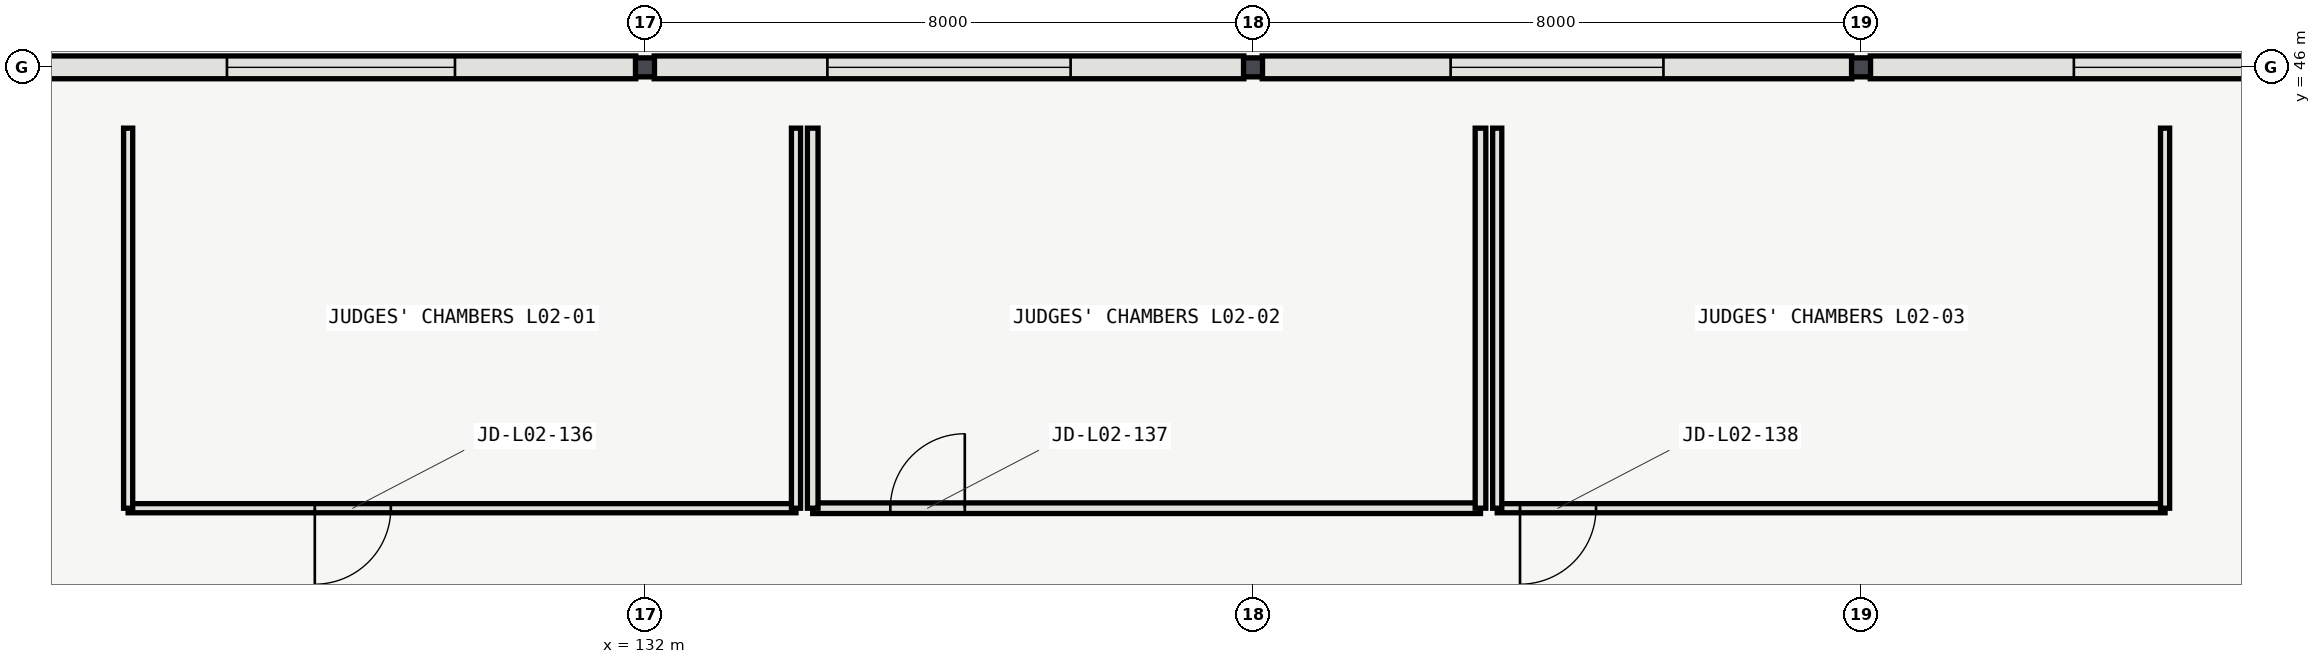
"""IFC4 building model, lengths in metres.
Left out: names, types, materials, properties, quantities, classifications, styles, units other than length and angle.
Written with IfcOpenShell. Run it as: python <this file> out.ifc"""

import sys

from ifc_helpers import new_model, si_unit, direction, frame, frame_2d, origin, origin_2d, place, context, subcontext, project, spatial, rectangle, i_section, extrude, element, fill, save


model = new_model("IFC4")
c1 = context("Model", 3, precision=1e-05, world=origin(), true_north=direction((0.0, 1.0)))
c2 = subcontext(c1, "Body", "Model", "MODEL_VIEW")
j1 = project(units=[si_unit("LENGTHUNIT", "METRE"), si_unit("PLANEANGLEUNIT", "RADIAN")], contexts=[c1])
p1 = place(None, origin())
s1 = spatial("IfcSite", under=j1, at=p1, CompositionType="ELEMENT")
p2 = place(p1, origin())
s2 = spatial("IfcBuilding", under=s1, at=p2, CompositionType="ELEMENT")
p3 = place(p2, frame((0.0, 0.0, 10.8)))
s3 = spatial("IfcBuildingStorey", under=s2, at=p3, CompositionType="ELEMENT", Elevation=10.8)
for number, where, z_axis, x_axis in (
    (1, (132.0, 46.0, 0.0), (0.0, 0.0, 1.0), (1.0, 0.0, 0.0)),
    (2, (140.0, 46.0, 0.0), (0.0, 0.0, 1.0), (1.0, 0.0, 0.0)),
    (3, (148.0, 46.0, 0.0), (0.0, 0.0, 1.0), (1.0, 0.0, 0.0)),
):
    element("IfcColumn", number, at=place(p3, frame(where, z_axis=z_axis, x_axis=x_axis)), inside=s3, PredefinedType="COLUMN", context=c2, shape_type="SweptSolid", body=[
        extrude(i_section(OverallWidth=0.25, OverallDepth=0.25, WebThickness=0.009, FlangeThickness=0.014, FilletRadius=0.016, at=origin_2d()), origin(), (0.0, 0.0, 1.0), 5.4),
    ])
p4 = place(p3, frame((131.879, 46.0, 0.0), z_axis=(0.0, 0.0, 1.0), x_axis=(-1.0, 0.0, 0.0)))
e4 = element("IfcWall", 4, at=p4, inside=s3, PredefinedType="SOLIDWALL", context=c2, shape_type="SweptSolid", body=[
    extrude(rectangle(XDim=7.758, YDim=0.3, at=frame_2d((3.879, 0.0))), origin(), (0.0, 0.0, 1.0), 4.603),
])
p5 = place(p4, frame((2.379, 0.0, 0.95)))
e5 = element("IfcOpeningElement", 5, at=p5, cuts=e4, PredefinedType="OPENING", context=c2, shape_type="SweptSolid", body=[
    extrude(rectangle(XDim=3.0, YDim=2.4, at=frame_2d((1.5, 1.2))), frame((0.0, 0.16, 0.0), z_axis=(0.0, -1.0, 0.0), x_axis=(1.0, 0.0, 0.0)), (0.0, 0.0, 1.0), 0.32),
])
p6 = place(p3, frame((139.879, 46.0, 0.0), z_axis=(0.0, 0.0, 1.0), x_axis=(-1.0, 0.0, 0.0)))
e6 = element("IfcWall", 6, at=p6, inside=s3, PredefinedType="SOLIDWALL", context=c2, shape_type="SweptSolid", body=[
    extrude(rectangle(XDim=7.758, YDim=0.3, at=frame_2d((3.879, 0.0))), origin(), (0.0, 0.0, 1.0), 4.603),
])
p7 = place(p6, frame((2.279, 0.0, 0.95)))
e7 = element("IfcOpeningElement", 7, at=p7, cuts=e6, PredefinedType="OPENING", context=c2, shape_type="SweptSolid", body=[
    extrude(rectangle(XDim=3.2, YDim=2.6, at=frame_2d((1.6, 1.3))), frame((0.0, 0.16, 0.0), z_axis=(0.0, -1.0, 0.0), x_axis=(1.0, 0.0, 0.0)), (0.0, 0.0, 1.0), 0.32),
])
p8 = place(p3, frame((147.879, 46.0, 0.0), z_axis=(0.0, 0.0, 1.0), x_axis=(-1.0, 0.0, 0.0)))
e8 = element("IfcWall", 8, at=p8, inside=s3, PredefinedType="SOLIDWALL", context=c2, shape_type="SweptSolid", body=[
    extrude(rectangle(XDim=7.758, YDim=0.3, at=frame_2d((3.879, 0.0))), origin(), (0.0, 0.0, 1.0), 4.603),
])
p9 = place(p8, frame((2.479, 0.0, 0.95)))
e9 = element("IfcOpeningElement", 9, at=p9, cuts=e8, PredefinedType="OPENING", context=c2, shape_type="SweptSolid", body=[
    extrude(rectangle(XDim=2.8, YDim=2.6, at=frame_2d((1.4, 1.3))), frame((0.0, 0.16, 0.0), z_axis=(0.0, -1.0, 0.0), x_axis=(1.0, 0.0, 0.0)), (0.0, 0.0, 1.0), 0.32),
])
p10 = place(p3, frame((155.879, 46.0, 0.0), z_axis=(0.0, 0.0, 1.0), x_axis=(-1.0, 0.0, 0.0)))
e10 = element("IfcWall", 10, at=p10, inside=s3, PredefinedType="SOLIDWALL", context=c2, shape_type="SweptSolid", body=[
    extrude(rectangle(XDim=7.758, YDim=0.3, at=frame_2d((3.879, 0.0))), origin(), (0.0, 0.0, 1.0), 4.603),
])
p11 = place(p10, frame((2.679, 0.0, 0.95)))
e11 = element("IfcOpeningElement", 11, at=p11, cuts=e10, PredefinedType="OPENING", context=c2, shape_type="SweptSolid", body=[
    extrude(rectangle(XDim=2.4, YDim=2.6, at=frame_2d((1.2, 1.3))), frame((0.0, 0.16, 0.0), z_axis=(0.0, -1.0, 0.0), x_axis=(1.0, 0.0, 0.0)), (0.0, 0.0, 1.0), 0.32),
])
p12 = place(p3, frame((125.2, 40.2, 0.0), z_axis=(0.0, 0.0, 1.0), x_axis=(1.0, 0.0, 0.0)))
e12 = element("IfcWall", 12, at=p12, inside=s3, PredefinedType="PARTITIONING", context=c2, shape_type="SweptSolid", body=[
    extrude(rectangle(XDim=8.787, YDim=0.12, at=frame_2d((4.394, 0.0))), origin(), (0.0, 0.0, 1.0), 5.12),
])
p13 = place(p12, frame((2.456, 0.0, 0.0)))
e13 = element("IfcOpeningElement", 13, at=p13, cuts=e12, PredefinedType="OPENING", context=c2, shape_type="SweptSolid", body=[
    extrude(rectangle(XDim=1.0, YDim=2.2, at=frame_2d((0.5, 1.1))), frame((0.0, 0.07, 0.0), z_axis=(0.0, -1.0, 0.0), x_axis=(1.0, 0.0, 0.0)), (0.0, 0.0, 1.0), 0.14),
])
for number, where, z_axis, x_axis in (
    (14, (125.2, 45.2, 0.0), (0.0, 0.0, 1.0), (0.0, -1.0, 0.0)),
    (15, (133.987, 40.2, 0.0), (0.0, 0.0, 1.0), (0.0, 1.0, 0.0)),
):
    element("IfcWall", number, at=place(p3, frame(where, z_axis=z_axis, x_axis=x_axis)), inside=s3, PredefinedType="PARTITIONING", context=c2, shape_type="SweptSolid", body=[
        extrude(rectangle(XDim=5.0, YDim=0.12, at=frame_2d((2.5, 0.0))), origin(), (0.0, 0.0, 1.0), 5.12),
    ])
p14 = place(p3, frame((134.207, 40.2, 0.0), z_axis=(0.0, 0.0, 1.0), x_axis=(1.0, 0.0, 0.0)))
e16 = element("IfcWall", 16, at=p14, inside=s3, PredefinedType="PARTITIONING", context=c2, shape_type="SweptSolid", body=[
    extrude(rectangle(XDim=8.786, YDim=0.14, at=frame_2d((4.393, 0.0))), origin(), (0.0, 0.0, 1.0), 5.12),
])
p15 = place(p14, frame((1.021, 0.0, 0.0)))
e17 = element("IfcOpeningElement", 17, at=p15, cuts=e16, PredefinedType="OPENING", context=c2, shape_type="SweptSolid", body=[
    extrude(rectangle(XDim=0.98, YDim=2.2, at=frame_2d((0.49, 1.1))), frame((0.0, 0.08, 0.0), z_axis=(0.0, -1.0, 0.0), x_axis=(1.0, 0.0, 0.0)), (0.0, 0.0, 1.0), 0.16),
])
for number, where, z_axis, x_axis in (
    (18, (134.207, 45.2, 0.0), (0.0, 0.0, 1.0), (0.0, -1.0, 0.0)),
    (19, (142.993, 40.2, 0.0), (0.0, 0.0, 1.0), (0.0, 1.0, 0.0)),
):
    element("IfcWall", number, at=place(p3, frame(where, z_axis=z_axis, x_axis=x_axis)), inside=s3, PredefinedType="PARTITIONING", context=c2, shape_type="SweptSolid", body=[
        extrude(rectangle(XDim=5.0, YDim=0.14, at=frame_2d((2.5, 0.0))), origin(), (0.0, 0.0, 1.0), 5.12),
    ])
p16 = place(p3, frame((143.213, 40.2, 0.0), z_axis=(0.0, 0.0, 1.0), x_axis=(1.0, 0.0, 0.0)))
e20 = element("IfcWall", 20, at=p16, inside=s3, PredefinedType="PARTITIONING", context=c2, shape_type="SweptSolid", body=[
    extrude(rectangle(XDim=8.787, YDim=0.12, at=frame_2d((4.394, 0.0))), origin(), (0.0, 0.0, 1.0), 5.12),
])
p17 = place(p16, frame((0.3, 0.0, 0.0)))
e21 = element("IfcOpeningElement", 21, at=p17, cuts=e20, PredefinedType="OPENING", context=c2, shape_type="SweptSolid", body=[
    extrude(rectangle(XDim=1.0, YDim=2.15, at=frame_2d((0.5, 1.075))), frame((0.0, 0.07, 0.0), z_axis=(0.0, -1.0, 0.0), x_axis=(1.0, 0.0, 0.0)), (0.0, 0.0, 1.0), 0.14),
])
p18 = place(p3, frame((143.213, 45.2, 0.0), z_axis=(0.0, 0.0, 1.0), x_axis=(0.0, -1.0, 0.0)))
e22 = element("IfcWall", 22, at=p18, inside=s3, PredefinedType="PARTITIONING", context=c2, shape_type="SweptSolid", body=[
    extrude(rectangle(XDim=5.0, YDim=0.12, at=frame_2d((2.5, 0.0))), origin(), (0.0, 0.0, 1.0), 5.12),
])
p19 = place(p3, frame((152.0, 40.2, 0.0), z_axis=(0.0, 0.0, 1.0), x_axis=(0.0, 1.0, 0.0)))
e23 = element("IfcWall", 23, at=p19, inside=s3, PredefinedType="PARTITIONING", context=c2, shape_type="SweptSolid", body=[
    extrude(rectangle(XDim=5.0, YDim=0.12, at=frame_2d((2.5, 0.0))), origin(), (0.0, 0.0, 1.0), 4.646),
])
p20 = place(p5, origin())
e24 = element("IfcWindow", 24, at=p20, inside=s3, PartitioningType="SINGLE_PANEL", PredefinedType="WINDOW", context=c2, shape_type="SweptSolid", body=[
    extrude(rectangle(XDim=3.0, YDim=2.4, at=frame_2d((1.5, 1.2))), frame((0.0, 0.03, 0.0), z_axis=(0.0, -1.0, 0.0), x_axis=(1.0, 0.0, 0.0)), (0.0, 0.0, 1.0), 0.06),
])
fill(e5, e24)
p21 = place(p7, origin())
e25 = element("IfcWindow", 25, at=p21, inside=s3, PartitioningType="SINGLE_PANEL", PredefinedType="WINDOW", context=c2, shape_type="SweptSolid", body=[
    extrude(rectangle(XDim=3.2, YDim=2.6, at=frame_2d((1.6, 1.3))), frame((0.0, 0.03, 0.0), z_axis=(0.0, -1.0, 0.0), x_axis=(1.0, 0.0, 0.0)), (0.0, 0.0, 1.0), 0.06),
])
fill(e7, e25)
p22 = place(p9, origin())
e26 = element("IfcWindow", 26, at=p22, inside=s3, PartitioningType="SINGLE_PANEL", PredefinedType="WINDOW", context=c2, shape_type="SweptSolid", body=[
    extrude(rectangle(XDim=2.8, YDim=2.6, at=frame_2d((1.4, 1.3))), frame((0.0, 0.03, 0.0), z_axis=(0.0, -1.0, 0.0), x_axis=(1.0, 0.0, 0.0)), (0.0, 0.0, 1.0), 0.06),
])
fill(e9, e26)
p23 = place(p11, origin())
e27 = element("IfcWindow", 27, at=p23, inside=s3, PartitioningType="SINGLE_PANEL", PredefinedType="WINDOW", context=c2, shape_type="SweptSolid", body=[
    extrude(rectangle(XDim=2.4, YDim=2.6, at=frame_2d((1.2, 1.3))), frame((0.0, 0.03, 0.0), z_axis=(0.0, -1.0, 0.0), x_axis=(1.0, 0.0, 0.0)), (0.0, 0.0, 1.0), 0.06),
])
fill(e11, e27)
p24 = place(p13, origin())
e28 = element("IfcDoor", 28, at=p24, inside=s3, OperationType="SINGLE_SWING_LEFT", PredefinedType="DOOR", context=c2, shape_type="SweptSolid", body=[
    extrude(rectangle(XDim=1.0, YDim=2.2, at=frame_2d((0.5, 1.1))), frame((0.0, 0.025, 0.0), z_axis=(0.0, -1.0, 0.0), x_axis=(1.0, 0.0, 0.0)), (0.0, 0.0, 1.0), 0.05),
])
fill(e13, e28)
p25 = place(p15, origin())
e29 = element("IfcDoor", 29, at=p25, inside=s3, OperationType="SINGLE_SWING_RIGHT", PredefinedType="DOOR", context=c2, shape_type="SweptSolid", body=[
    extrude(rectangle(XDim=0.98, YDim=2.2, at=frame_2d((0.49, 1.1))), frame((0.0, 0.025, 0.0), z_axis=(0.0, -1.0, 0.0), x_axis=(1.0, 0.0, 0.0)), (0.0, 0.0, 1.0), 0.05),
])
fill(e17, e29)
p26 = place(p17, origin())
e30 = element("IfcDoor", 30, at=p26, inside=s3, OperationType="SINGLE_SWING_LEFT", PredefinedType="DOOR", context=c2, shape_type="SweptSolid", body=[
    extrude(rectangle(XDim=1.0, YDim=2.15, at=frame_2d((0.5, 1.075))), frame((0.0, 0.025, 0.0), z_axis=(0.0, -1.0, 0.0), x_axis=(1.0, 0.0, 0.0)), (0.0, 0.0, 1.0), 0.05),
])
fill(e21, e30)
save(model, sys.argv[1])
